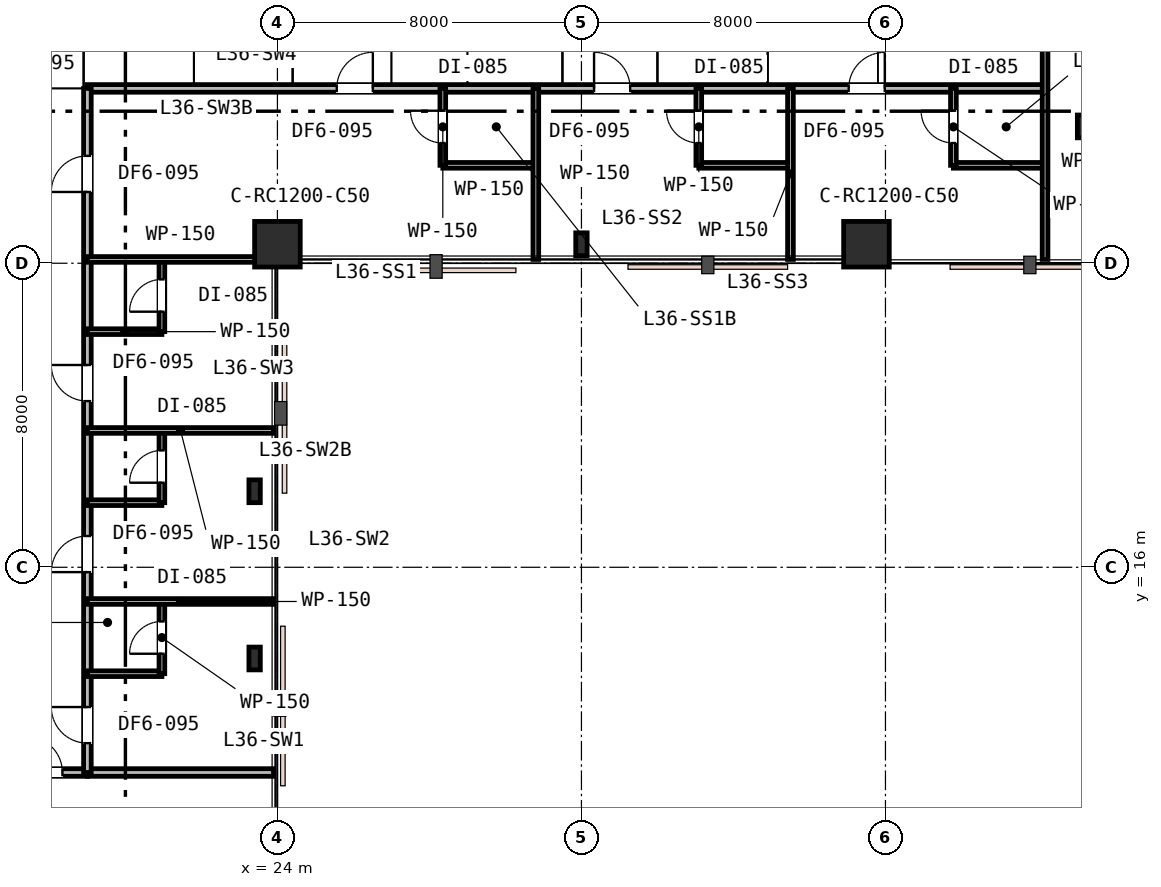
"""IFC4 building model, lengths in metres.
Left out: names, types, materials, properties, quantities, classifications, styles, units other than length and angle.
Written with IfcOpenShell. Run it as: python <this file> out.ifc"""

import sys

from ifc_helpers import new_model, si_unit, direction, frame, frame_2d, origin, origin_2d, place, context, subcontext, project, spatial, rectangle, i_section, extrude, element, fill, save


model = new_model("IFC4")
c1 = context("Model", 3, precision=1e-05, world=origin(), true_north=direction((0.0, 1.0)))
c2 = subcontext(c1, "Body", "Model", "MODEL_VIEW")
j1 = project(units=[si_unit("LENGTHUNIT", "METRE"), si_unit("PLANEANGLEUNIT", "RADIAN")], contexts=[c1])
p1 = place(None, origin())
s1 = spatial("IfcSite", under=j1, at=p1, CompositionType="ELEMENT")
p2 = place(p1, origin())
s2 = spatial("IfcBuilding", under=s1, at=p2, CompositionType="ELEMENT")
p3 = place(p2, frame((0.0, 0.0, 140.4)))
s3 = spatial("IfcBuildingStorey", under=s2, at=p3, CompositionType="ELEMENT", Elevation=140.4)
p4 = place(p3, frame((24.0, 24.5, 0.0), z_axis=(0.0, 0.0, 1.0), x_axis=(1.0, 0.0, 0.0)))
e1 = element("IfcColumn", 1, at=p4, inside=s3, PredefinedType="COLUMN", context=c2, shape_type="SweptSolid", body=[
    extrude(rectangle(XDim=1.2, YDim=1.2, at=origin_2d()), origin(), (0.0, 0.0, 1.0), 3.6),
])
p5 = place(p3, frame((32.0, 24.5, 0.0), z_axis=(0.0, 0.0, 1.0), x_axis=(1.0, 0.0, 0.0)))
e2 = element("IfcColumn", 2, at=p5, inside=s3, PredefinedType="COLUMN", context=c2, shape_type="SweptSolid", body=[
    extrude(i_section(OverallWidth=0.3, OverallDepth=0.6, WebThickness=0.015, FlangeThickness=0.03, FilletRadius=0.027, at=origin_2d()), origin(), (0.0, 0.0, 1.0), 3.6),
])
p6 = place(p3, frame((39.5, 24.5, 0.0), z_axis=(0.0, 0.0, 1.0), x_axis=(1.0, 0.0, 0.0)))
e3 = element("IfcColumn", 3, at=p6, inside=s3, PredefinedType="COLUMN", context=c2, shape_type="SweptSolid", body=[
    extrude(rectangle(XDim=1.2, YDim=1.2, at=origin_2d()), origin(), (0.0, 0.0, 1.0), 3.6),
])
for number, where, z_axis, x_axis in (
    (4, (45.2, 27.6, 0.0), (0.0, 0.0, 1.0), (1.0, 0.0, 0.0)),
    (5, (23.4, 13.6, 0.0), (0.0, 0.0, 1.0), (1.0, 0.0, 0.0)),
    (6, (23.4, 18.0, 0.0), (0.0, 0.0, 1.0), (1.0, 0.0, 0.0)),
):
    element("IfcColumn", number, at=place(p3, frame(where, z_axis=z_axis, x_axis=x_axis)), inside=s3, PredefinedType="COLUMN", context=c2, shape_type="SweptSolid", body=[
        extrude(i_section(OverallWidth=0.3, OverallDepth=0.6, WebThickness=0.015, FlangeThickness=0.03, FilletRadius=0.027, at=origin_2d()), origin(), (0.0, 0.0, 1.0), 3.6),
    ])
p7 = place(p3, frame((19.0, 28.6, 0.0), z_axis=(0.0, 0.0, 1.0), x_axis=(1.0, 0.0, 0.0)))
e7 = element("IfcWall", 7, at=p7, inside=s3, PredefinedType="PARTITIONING", context=c2, shape_type="SweptSolid", body=[
    extrude(rectangle(XDim=25.2, YDim=0.2, at=frame_2d((12.6, 0.0))), origin(), (0.0, 0.0, 1.0), 2.84),
])
p8 = place(p7, frame((6.561, 0.0, 0.0)))
e8 = element("IfcOpeningElement", 8, at=p8, cuts=e7, PredefinedType="OPENING", context=c2, shape_type="SweptSolid", body=[
    extrude(rectangle(XDim=0.95, YDim=2.15, at=frame_2d((0.475, 1.075))), frame((0.0, 0.11, 0.0), z_axis=(0.0, -1.0, 0.0), x_axis=(1.0, 0.0, 0.0)), (0.0, 0.0, 1.0), 0.22),
])
p9 = place(p7, frame((13.332, 0.0, 0.0)))
e9 = element("IfcOpeningElement", 9, at=p9, cuts=e7, PredefinedType="OPENING", context=c2, shape_type="SweptSolid", body=[
    extrude(rectangle(XDim=0.95, YDim=2.15, at=frame_2d((0.475, 1.075))), frame((0.0, 0.11, 0.0), z_axis=(0.0, -1.0, 0.0), x_axis=(1.0, 0.0, 0.0)), (0.0, 0.0, 1.0), 0.22),
])
p10 = place(p7, frame((20.032, 0.0, 0.0)))
e10 = element("IfcOpeningElement", 10, at=p10, cuts=e7, PredefinedType="OPENING", context=c2, shape_type="SweptSolid", body=[
    extrude(rectangle(XDim=0.95, YDim=2.15, at=frame_2d((0.475, 1.075))), frame((0.0, 0.11, 0.0), z_axis=(0.0, -1.0, 0.0), x_axis=(1.0, 0.0, 0.0)), (0.0, 0.0, 1.0), 0.22),
])
p11 = place(p3, frame((19.0, 10.6, 0.0), z_axis=(0.0, 0.0, 1.0), x_axis=(1.0, 0.0, 0.0)))
e11 = element("IfcWall", 11, at=p11, inside=s3, PredefinedType="PARTITIONING", context=c2, shape_type="SweptSolid", body=[
    extrude(rectangle(XDim=4.9, YDim=0.2, at=frame_2d((2.45, 0.0))), origin(), (0.0, 0.0, 1.0), 2.87),
])
p12 = place(p3, frame((16.8, 10.6, 0.0), z_axis=(0.0, 0.0, 1.0), x_axis=(1.0, 0.0, 0.0)))
e12 = element("IfcWall", 12, at=p12, inside=s3, PredefinedType="PARTITIONING", context=c2, shape_type="SweptSolid", body=[
    extrude(rectangle(XDim=2.2, YDim=0.2, at=frame_2d((1.1, 0.0))), origin(), (0.0, 0.0, 1.0), 2.87),
])
p13 = place(p12, frame((0.593, 0.0, 0.0)))
e13 = element("IfcOpeningElement", 13, at=p13, cuts=e12, PredefinedType="OPENING", context=c2, shape_type="SweptSolid", body=[
    extrude(rectangle(XDim=0.95, YDim=2.15, at=frame_2d((0.475, 1.075))), frame((0.0, 0.11, 0.0), z_axis=(0.0, -1.0, 0.0), x_axis=(1.0, 0.0, 0.0)), (0.0, 0.0, 1.0), 0.22),
])
p14 = place(p3, frame((19.0, 10.6, 0.0), z_axis=(0.0, 0.0, 1.0), x_axis=(0.0, 1.0, 0.0)))
e14 = element("IfcWall", 14, at=p14, inside=s3, PredefinedType="PARTITIONING", context=c2, shape_type="SweptSolid", body=[
    extrude(rectangle(XDim=18.0, YDim=0.2, at=frame_2d((9.0, 0.0))), origin(), (0.0, 0.0, 1.0), 2.84),
])
p15 = place(p14, frame((0.772, 0.0, 0.0)))
e15 = element("IfcOpeningElement", 15, at=p15, cuts=e14, PredefinedType="OPENING", context=c2, shape_type="SweptSolid", body=[
    extrude(rectangle(XDim=0.95, YDim=2.15, at=frame_2d((0.475, 1.075))), frame((0.0, 0.11, 0.0), z_axis=(0.0, -1.0, 0.0), x_axis=(1.0, 0.0, 0.0)), (0.0, 0.0, 1.0), 0.22),
])
p16 = place(p14, frame((5.272, 0.0, 0.0)))
e16 = element("IfcOpeningElement", 16, at=p16, cuts=e14, PredefinedType="OPENING", context=c2, shape_type="SweptSolid", body=[
    extrude(rectangle(XDim=0.95, YDim=2.15, at=frame_2d((0.475, 1.075))), frame((0.0, 0.11, 0.0), z_axis=(0.0, -1.0, 0.0), x_axis=(1.0, 0.0, 0.0)), (0.0, 0.0, 1.0), 0.22),
])
p17 = place(p14, frame((9.773, 0.0, 0.0)))
e17 = element("IfcOpeningElement", 17, at=p17, cuts=e14, PredefinedType="OPENING", context=c2, shape_type="SweptSolid", body=[
    extrude(rectangle(XDim=0.95, YDim=2.15, at=frame_2d((0.475, 1.075))), frame((0.0, 0.11, 0.0), z_axis=(0.0, -1.0, 0.0), x_axis=(1.0, 0.0, 0.0)), (0.0, 0.0, 1.0), 0.22),
])
p18 = place(p14, frame((15.275, 0.0, 0.0)))
e18 = element("IfcOpeningElement", 18, at=p18, cuts=e14, PredefinedType="OPENING", context=c2, shape_type="SweptSolid", body=[
    extrude(rectangle(XDim=0.95, YDim=2.15, at=frame_2d((0.475, 1.075))), frame((0.0, 0.11, 0.0), z_axis=(0.0, -1.0, 0.0), x_axis=(1.0, 0.0, 0.0)), (0.0, 0.0, 1.0), 0.22),
])
p19 = place(p3, frame((19.0, 13.2, 0.0), z_axis=(0.0, 0.0, 1.0), x_axis=(1.0, 0.0, 0.0)))
e19 = element("IfcWall", 19, at=p19, inside=s3, PredefinedType="PARTITIONING", context=c2, shape_type="SweptSolid", body=[
    extrude(rectangle(XDim=1.96, YDim=0.15, at=frame_2d((0.98, 0.0))), origin(), (0.0, 0.0, 1.0), 2.84),
])
p20 = place(p3, frame((20.96, 13.2, 0.0), z_axis=(0.0, 0.0, 1.0), x_axis=(0.0, 1.0, 0.0)))
e20 = element("IfcWall", 20, at=p20, inside=s3, PredefinedType="PARTITIONING", context=c2, shape_type="SweptSolid", body=[
    extrude(rectangle(XDim=1.9, YDim=0.15, at=frame_2d((0.95, 0.0))), origin(), (0.0, 0.0, 1.0), 2.84),
])
p21 = place(p20, frame((0.525, 0.0, 0.0)))
e21 = element("IfcOpeningElement", 21, at=p21, cuts=e20, PredefinedType="OPENING", context=c2, shape_type="SweptSolid", body=[
    extrude(rectangle(XDim=0.85, YDim=2.15, at=frame_2d((0.425, 1.075))), frame((0.0, 0.085, 0.0), z_axis=(0.0, -1.0, 0.0), x_axis=(1.0, 0.0, 0.0)), (0.0, 0.0, 1.0), 0.17),
])
p22 = place(p3, frame((19.0, 15.1, 0.0), z_axis=(0.0, 0.0, 1.0), x_axis=(1.0, 0.0, 0.0)))
e22 = element("IfcWall", 22, at=p22, inside=s3, PredefinedType="PARTITIONING", context=c2, shape_type="SweptSolid", body=[
    extrude(rectangle(XDim=4.9, YDim=0.15, at=frame_2d((2.45, 0.0))), origin(), (0.0, 0.0, 1.0), 2.87),
])
p23 = place(p3, frame((19.0, 17.7, 0.0), z_axis=(0.0, 0.0, 1.0), x_axis=(1.0, 0.0, 0.0)))
e23 = element("IfcWall", 23, at=p23, inside=s3, PredefinedType="PARTITIONING", context=c2, shape_type="SweptSolid", body=[
    extrude(rectangle(XDim=1.96, YDim=0.15, at=frame_2d((0.98, 0.0))), origin(), (0.0, 0.0, 1.0), 2.84),
])
p24 = place(p3, frame((20.96, 17.7, 0.0), z_axis=(0.0, 0.0, 1.0), x_axis=(0.0, 1.0, 0.0)))
e24 = element("IfcWall", 24, at=p24, inside=s3, PredefinedType="PARTITIONING", context=c2, shape_type="SweptSolid", body=[
    extrude(rectangle(XDim=1.9, YDim=0.15, at=frame_2d((0.95, 0.0))), origin(), (0.0, 0.0, 1.0), 2.84),
])
p25 = place(p24, frame((0.525, 0.0, 0.0)))
e25 = element("IfcOpeningElement", 25, at=p25, cuts=e24, PredefinedType="OPENING", context=c2, shape_type="SweptSolid", body=[
    extrude(rectangle(XDim=0.85, YDim=2.15, at=frame_2d((0.425, 1.075))), frame((0.0, 0.085, 0.0), z_axis=(0.0, -1.0, 0.0), x_axis=(1.0, 0.0, 0.0)), (0.0, 0.0, 1.0), 0.17),
])
p26 = place(p3, frame((19.0, 19.6, 0.0), z_axis=(0.0, 0.0, 1.0), x_axis=(1.0, 0.0, 0.0)))
e26 = element("IfcWall", 26, at=p26, inside=s3, PredefinedType="PARTITIONING", context=c2, shape_type="SweptSolid", body=[
    extrude(rectangle(XDim=4.9, YDim=0.15, at=frame_2d((2.45, 0.0))), origin(), (0.0, 0.0, 1.0), 3.24),
])
p27 = place(p3, frame((19.0, 22.2, 0.0), z_axis=(0.0, 0.0, 1.0), x_axis=(1.0, 0.0, 0.0)))
e27 = element("IfcWall", 27, at=p27, inside=s3, PredefinedType="PARTITIONING", context=c2, shape_type="SweptSolid", body=[
    extrude(rectangle(XDim=1.96, YDim=0.15, at=frame_2d((0.98, 0.0))), origin(), (0.0, 0.0, 1.0), 3.24),
])
p28 = place(p3, frame((20.96, 22.2, 0.0), z_axis=(0.0, 0.0, 1.0), x_axis=(0.0, 1.0, 0.0)))
e28 = element("IfcWall", 28, at=p28, inside=s3, PredefinedType="PARTITIONING", context=c2, shape_type="SweptSolid", body=[
    extrude(rectangle(XDim=1.9, YDim=0.15, at=frame_2d((0.95, 0.0))), origin(), (0.0, 0.0, 1.0), 2.84),
])
p29 = place(p28, frame((0.525, 0.0, 0.0)))
e29 = element("IfcOpeningElement", 29, at=p29, cuts=e28, PredefinedType="OPENING", context=c2, shape_type="SweptSolid", body=[
    extrude(rectangle(XDim=0.85, YDim=2.15, at=frame_2d((0.425, 1.075))), frame((0.0, 0.085, 0.0), z_axis=(0.0, -1.0, 0.0), x_axis=(1.0, 0.0, 0.0)), (0.0, 0.0, 1.0), 0.17),
])
p30 = place(p3, frame((19.0, 24.1, 0.0), z_axis=(0.0, 0.0, 1.0), x_axis=(1.0, 0.0, 0.0)))
e30 = element("IfcWall", 30, at=p30, inside=s3, PredefinedType="PARTITIONING", context=c2, shape_type="SweptSolid", body=[
    extrude(rectangle(XDim=4.9, YDim=0.15, at=frame_2d((2.45, 0.0))), origin(), (0.0, 0.0, 1.0), 2.84),
])
p31 = place(p3, frame((28.352, 26.576, 0.0), z_axis=(0.0, 0.0, 1.0), x_axis=(1.0, 0.0, 0.0)))
e31 = element("IfcWall", 31, at=p31, inside=s3, PredefinedType="PARTITIONING", context=c2, shape_type="SweptSolid", body=[
    extrude(rectangle(XDim=2.448, YDim=0.15, at=frame_2d((1.224, 0.0))), origin(), (0.0, 0.0, 1.0), 3.24),
])
p32 = place(p3, frame((28.352, 26.576, 0.0), z_axis=(0.0, 0.0, 1.0), x_axis=(0.0, 1.0, 0.0)))
e32 = element("IfcWall", 32, at=p32, inside=s3, PredefinedType="PARTITIONING", context=c2, shape_type="SweptSolid", body=[
    extrude(rectangle(XDim=2.024, YDim=0.15, at=frame_2d((1.012, 0.0))), origin(), (0.0, 0.0, 1.0), 3.24),
])
p33 = place(p32, frame((0.587, 0.0, 0.0)))
e33 = element("IfcOpeningElement", 33, at=p33, cuts=e32, PredefinedType="OPENING", context=c2, shape_type="SweptSolid", body=[
    extrude(rectangle(XDim=0.85, YDim=2.15, at=frame_2d((0.425, 1.075))), frame((0.0, 0.085, 0.0), z_axis=(0.0, -1.0, 0.0), x_axis=(1.0, 0.0, 0.0)), (0.0, 0.0, 1.0), 0.17),
])
p34 = place(p3, frame((30.8, 28.6, 0.0), z_axis=(0.0, 0.0, 1.0), x_axis=(0.0, -1.0, 0.0)))
e34 = element("IfcWall", 34, at=p34, inside=s3, PredefinedType="PARTITIONING", context=c2, shape_type="SweptSolid", body=[
    extrude(rectangle(XDim=4.5, YDim=0.15, at=frame_2d((2.25, 0.0))), origin(), (0.0, 0.0, 1.0), 2.92),
])
p35 = place(p3, frame((35.088, 26.576, 0.0), z_axis=(0.0, 0.0, 1.0), x_axis=(1.0, 0.0, 0.0)))
e35 = element("IfcWall", 35, at=p35, inside=s3, PredefinedType="PARTITIONING", context=c2, shape_type="SweptSolid", body=[
    extrude(rectangle(XDim=2.412, YDim=0.15, at=frame_2d((1.206, 0.0))), origin(), (0.0, 0.0, 1.0), 2.87),
])
p36 = place(p3, frame((35.088, 26.576, 0.0), z_axis=(0.0, 0.0, 1.0), x_axis=(0.0, 1.0, 0.0)))
e36 = element("IfcWall", 36, at=p36, inside=s3, PredefinedType="PARTITIONING", context=c2, shape_type="SweptSolid", body=[
    extrude(rectangle(XDim=2.024, YDim=0.15, at=frame_2d((1.012, 0.0))), origin(), (0.0, 0.0, 1.0), 3.24),
])
p37 = place(p36, frame((0.587, 0.0, 0.0)))
e37 = element("IfcOpeningElement", 37, at=p37, cuts=e36, PredefinedType="OPENING", context=c2, shape_type="SweptSolid", body=[
    extrude(rectangle(XDim=0.85, YDim=2.15, at=frame_2d((0.425, 1.075))), frame((0.0, 0.085, 0.0), z_axis=(0.0, -1.0, 0.0), x_axis=(1.0, 0.0, 0.0)), (0.0, 0.0, 1.0), 0.17),
])
p38 = place(p3, frame((37.5, 28.6, 0.0), z_axis=(0.0, 0.0, 1.0), x_axis=(0.0, -1.0, 0.0)))
e38 = element("IfcWall", 38, at=p38, inside=s3, PredefinedType="PARTITIONING", context=c2, shape_type="SweptSolid", body=[
    extrude(rectangle(XDim=4.5, YDim=0.15, at=frame_2d((2.25, 0.0))), origin(), (0.0, 0.0, 1.0), 2.87),
])
p39 = place(p3, frame((41.788, 26.576, 0.0), z_axis=(0.0, 0.0, 1.0), x_axis=(1.0, 0.0, 0.0)))
e39 = element("IfcWall", 39, at=p39, inside=s3, PredefinedType="PARTITIONING", context=c2, shape_type="SweptSolid", body=[
    extrude(rectangle(XDim=2.412, YDim=0.15, at=frame_2d((1.206, 0.0))), origin(), (0.0, 0.0, 1.0), 3.24),
])
p40 = place(p3, frame((41.788, 26.576, 0.0), z_axis=(0.0, 0.0, 1.0), x_axis=(0.0, 1.0, 0.0)))
e40 = element("IfcWall", 40, at=p40, inside=s3, PredefinedType="PARTITIONING", context=c2, shape_type="SweptSolid", body=[
    extrude(rectangle(XDim=2.024, YDim=0.15, at=frame_2d((1.012, 0.0))), origin(), (0.0, 0.0, 1.0), 3.24),
])
p41 = place(p40, frame((0.587, 0.0, 0.0)))
e41 = element("IfcOpeningElement", 41, at=p41, cuts=e40, PredefinedType="OPENING", context=c2, shape_type="SweptSolid", body=[
    extrude(rectangle(XDim=0.85, YDim=2.15, at=frame_2d((0.425, 1.075))), frame((0.0, 0.085, 0.0), z_axis=(0.0, -1.0, 0.0), x_axis=(1.0, 0.0, 0.0)), (0.0, 0.0, 1.0), 0.17),
])
p42 = place(p3, frame((44.2, 30.8, 0.0), z_axis=(0.0, 0.0, 1.0), x_axis=(0.0, -1.0, 0.0)))
e42 = element("IfcWall", 42, at=p42, inside=s3, PredefinedType="PARTITIONING", context=c2, shape_type="SweptSolid", body=[
    extrude(rectangle(XDim=6.7, YDim=0.15, at=frame_2d((3.35, 0.0))), origin(), (0.0, 0.0, 1.0), 2.84),
])
p43 = place(p13, origin())
e43 = element("IfcDoor", 43, at=p43, inside=s3, OperationType="SINGLE_SWING_LEFT", PredefinedType="DOOR", context=c2, shape_type="SweptSolid", body=[
    extrude(rectangle(XDim=0.95, YDim=2.15, at=frame_2d((0.475, 1.075))), frame((0.0, 0.025, 0.0), z_axis=(0.0, -1.0, 0.0), x_axis=(1.0, 0.0, 0.0)), (0.0, 0.0, 1.0), 0.05),
])
fill(e13, e43)
p44 = place(p15, origin())
e44 = element("IfcDoor", 44, at=p44, inside=s3, OperationType="SINGLE_SWING_RIGHT", PredefinedType="DOOR", context=c2, shape_type="SweptSolid", body=[
    extrude(rectangle(XDim=0.95, YDim=2.15, at=frame_2d((0.475, 1.075))), frame((0.0, 0.025, 0.0), z_axis=(0.0, -1.0, 0.0), x_axis=(1.0, 0.0, 0.0)), (0.0, 0.0, 1.0), 0.05),
])
fill(e15, e44)
p45 = place(p21, origin())
e45 = element("IfcDoor", 45, at=p45, inside=s3, OperationType="SINGLE_SWING_LEFT", PredefinedType="DOOR", context=c2, shape_type="SweptSolid", body=[
    extrude(rectangle(XDim=0.85, YDim=2.15, at=frame_2d((0.425, 1.075))), frame((0.0, 0.025, 0.0), z_axis=(0.0, -1.0, 0.0), x_axis=(1.0, 0.0, 0.0)), (0.0, 0.0, 1.0), 0.05),
])
fill(e21, e45)
p46 = place(p16, origin())
e46 = element("IfcDoor", 46, at=p46, inside=s3, OperationType="SINGLE_SWING_LEFT", PredefinedType="DOOR", context=c2, shape_type="SweptSolid", body=[
    extrude(rectangle(XDim=0.95, YDim=2.15, at=frame_2d((0.475, 1.075))), frame((0.0, 0.025, 0.0), z_axis=(0.0, -1.0, 0.0), x_axis=(1.0, 0.0, 0.0)), (0.0, 0.0, 1.0), 0.05),
])
fill(e16, e46)
p47 = place(p25, origin())
e47 = element("IfcDoor", 47, at=p47, inside=s3, OperationType="SINGLE_SWING_LEFT", PredefinedType="DOOR", context=c2, shape_type="SweptSolid", body=[
    extrude(rectangle(XDim=0.85, YDim=2.15, at=frame_2d((0.425, 1.075))), frame((0.0, 0.025, 0.0), z_axis=(0.0, -1.0, 0.0), x_axis=(1.0, 0.0, 0.0)), (0.0, 0.0, 1.0), 0.05),
])
fill(e25, e47)
p48 = place(p17, origin())
e48 = element("IfcDoor", 48, at=p48, inside=s3, OperationType="SINGLE_SWING_RIGHT", PredefinedType="DOOR", context=c2, shape_type="SweptSolid", body=[
    extrude(rectangle(XDim=0.95, YDim=2.15, at=frame_2d((0.475, 1.075))), frame((0.0, 0.025, 0.0), z_axis=(0.0, -1.0, 0.0), x_axis=(1.0, 0.0, 0.0)), (0.0, 0.0, 1.0), 0.05),
])
fill(e17, e48)
p49 = place(p29, origin())
e49 = element("IfcDoor", 49, at=p49, inside=s3, OperationType="SINGLE_SWING_LEFT", PredefinedType="DOOR", context=c2, shape_type="SweptSolid", body=[
    extrude(rectangle(XDim=0.85, YDim=2.15, at=frame_2d((0.425, 1.075))), frame((0.0, 0.025, 0.0), z_axis=(0.0, -1.0, 0.0), x_axis=(1.0, 0.0, 0.0)), (0.0, 0.0, 1.0), 0.05),
])
fill(e29, e49)
p50 = place(p18, origin())
e50 = element("IfcDoor", 50, at=p50, inside=s3, OperationType="SINGLE_SWING_LEFT", PredefinedType="DOOR", context=c2, shape_type="SweptSolid", body=[
    extrude(rectangle(XDim=0.95, YDim=2.15, at=frame_2d((0.475, 1.075))), frame((0.0, 0.025, 0.0), z_axis=(0.0, -1.0, 0.0), x_axis=(1.0, 0.0, 0.0)), (0.0, 0.0, 1.0), 0.05),
])
fill(e18, e50)
p51 = place(p8, origin())
e51 = element("IfcDoor", 51, at=p51, inside=s3, OperationType="SINGLE_SWING_RIGHT", PredefinedType="DOOR", context=c2, shape_type="SweptSolid", body=[
    extrude(rectangle(XDim=0.95, YDim=2.15, at=frame_2d((0.475, 1.075))), frame((0.0, 0.025, 0.0), z_axis=(0.0, -1.0, 0.0), x_axis=(1.0, 0.0, 0.0)), (0.0, 0.0, 1.0), 0.05),
])
fill(e8, e51)
p52 = place(p33, origin())
e52 = element("IfcDoor", 52, at=p52, inside=s3, OperationType="SINGLE_SWING_RIGHT", PredefinedType="DOOR", context=c2, shape_type="SweptSolid", body=[
    extrude(rectangle(XDim=0.85, YDim=2.15, at=frame_2d((0.425, 1.075))), frame((0.0, 0.025, 0.0), z_axis=(0.0, -1.0, 0.0), x_axis=(1.0, 0.0, 0.0)), (0.0, 0.0, 1.0), 0.05),
])
fill(e33, e52)
p53 = place(p9, origin())
e53 = element("IfcDoor", 53, at=p53, inside=s3, OperationType="SINGLE_SWING_LEFT", PredefinedType="DOOR", context=c2, shape_type="SweptSolid", body=[
    extrude(rectangle(XDim=0.95, YDim=2.15, at=frame_2d((0.475, 1.075))), frame((0.0, 0.025, 0.0), z_axis=(0.0, -1.0, 0.0), x_axis=(1.0, 0.0, 0.0)), (0.0, 0.0, 1.0), 0.05),
])
fill(e9, e53)
p54 = place(p37, origin())
e54 = element("IfcDoor", 54, at=p54, inside=s3, OperationType="SINGLE_SWING_RIGHT", PredefinedType="DOOR", context=c2, shape_type="SweptSolid", body=[
    extrude(rectangle(XDim=0.85, YDim=2.15, at=frame_2d((0.425, 1.075))), frame((0.0, 0.025, 0.0), z_axis=(0.0, -1.0, 0.0), x_axis=(1.0, 0.0, 0.0)), (0.0, 0.0, 1.0), 0.05),
])
fill(e37, e54)
p55 = place(p10, origin())
e55 = element("IfcDoor", 55, at=p55, inside=s3, OperationType="SINGLE_SWING_RIGHT", PredefinedType="DOOR", context=c2, shape_type="SweptSolid", body=[
    extrude(rectangle(XDim=0.95, YDim=2.15, at=frame_2d((0.475, 1.075))), frame((0.0, 0.025, 0.0), z_axis=(0.0, -1.0, 0.0), x_axis=(1.0, 0.0, 0.0)), (0.0, 0.0, 1.0), 0.05),
])
fill(e10, e55)
p56 = place(p41, origin())
e56 = element("IfcDoor", 56, at=p56, inside=s3, OperationType="SINGLE_SWING_RIGHT", PredefinedType="DOOR", context=c2, shape_type="SweptSolid", body=[
    extrude(rectangle(XDim=0.85, YDim=2.15, at=frame_2d((0.425, 1.075))), frame((0.0, 0.025, 0.0), z_axis=(0.0, -1.0, 0.0), x_axis=(1.0, 0.0, 0.0)), (0.0, 0.0, 1.0), 0.05),
])
fill(e41, e56)
save(model, sys.argv[1])
